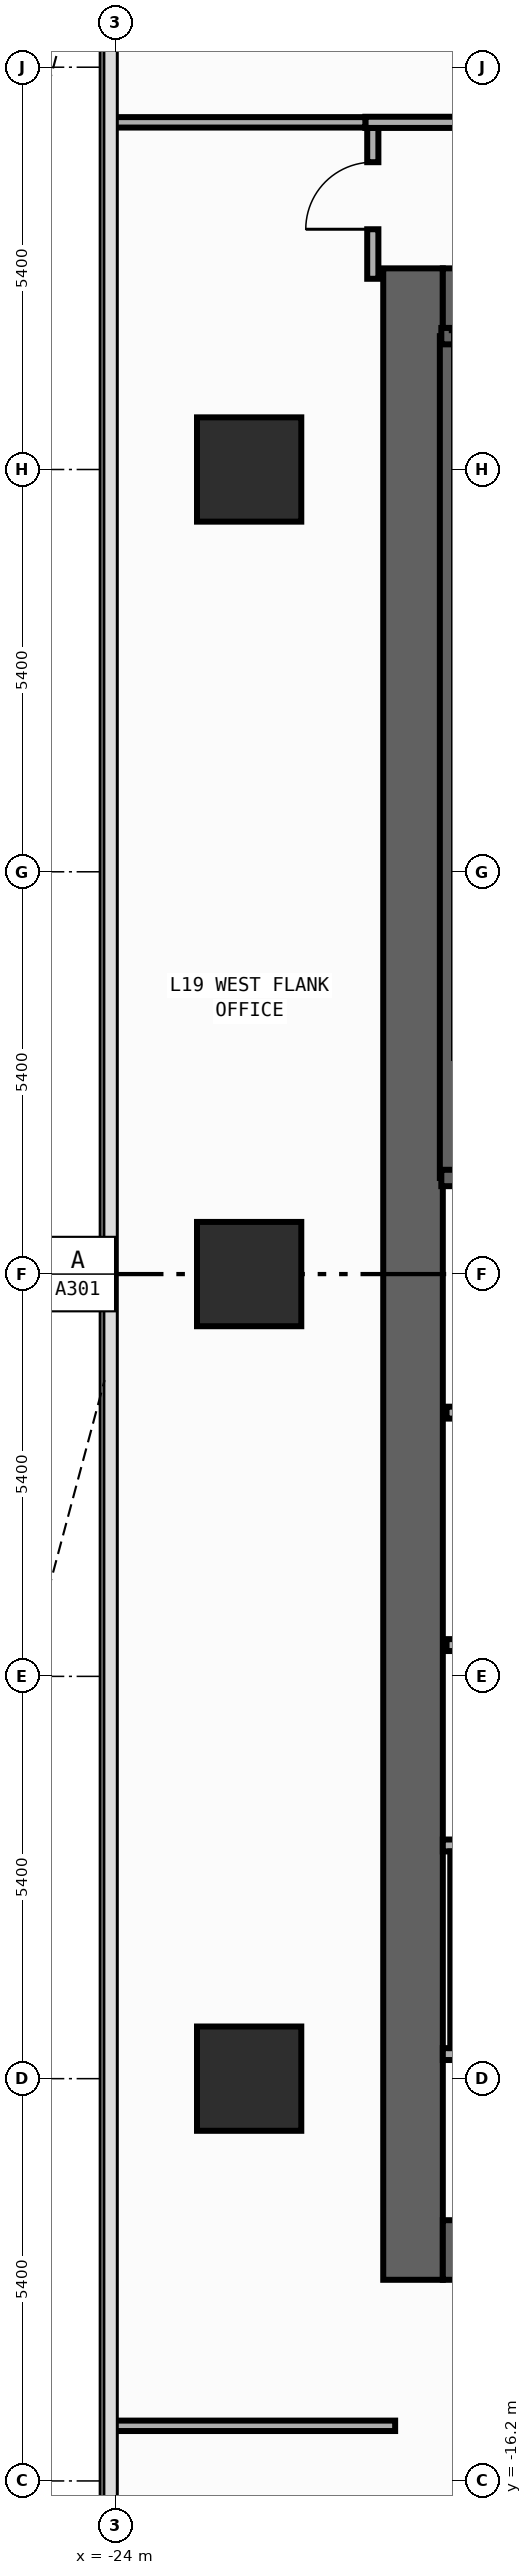
"""IFC4 building model, lengths in metres.
Left out: names, types, materials, properties, quantities, classifications, styles, units other than length and angle.
Written with IfcOpenShell. Run it as: python <this file> out.ifc"""

import sys

from ifc_helpers import new_model, si_unit, direction, frame, frame_2d, origin, origin_2d, place, context, subcontext, project, spatial, rectangle, extrude, element, fill, save


model = new_model("IFC4")
c1 = context("Model", 3, precision=1e-05, world=origin(), true_north=direction((0.0, 1.0)))
c2 = subcontext(c1, "Body", "Model", "MODEL_VIEW")
j1 = project(units=[si_unit("LENGTHUNIT", "METRE"), si_unit("PLANEANGLEUNIT", "RADIAN")], contexts=[c1])
p1 = place(None, origin())
s1 = spatial("IfcSite", under=j1, at=p1, CompositionType="ELEMENT")
p2 = place(p1, origin())
s2 = spatial("IfcBuilding", under=s1, at=p2, CompositionType="ELEMENT")
p3 = place(p2, frame((0.0, 0.0, 80.6)))
s3 = spatial("IfcBuildingStorey", under=s2, at=p3, CompositionType="ELEMENT", Elevation=80.6)
p4 = place(p3, frame((-20.0, -13.5, 0.0), z_axis=(0.0, 0.0, 1.0), x_axis=(0.0, 1.0, 0.0)))
e1 = element("IfcWall", 1, at=p4, inside=s3, PredefinedType="SHEAR", context=c2, shape_type="SweptSolid", body=[
    extrude(rectangle(XDim=27.0, YDim=0.8, at=frame_2d((13.5, 0.0))), origin(), (0.0, 0.0, 1.0), 3.85),
])
for number, where, z_axis, x_axis in (
    (2, (-19.6, -13.1, 0.0), (0.0, 0.0, 1.0), (1.0, 0.0, 0.0)),
    (3, (-19.6, 13.1, 0.0), (0.0, 0.0, 1.0), (1.0, 0.0, 0.0)),
):
    element("IfcWall", number, at=place(p3, frame(where, z_axis=z_axis, x_axis=x_axis)), inside=s3, PredefinedType="SHEAR", context=c2, shape_type="SweptSolid", body=[
        extrude(rectangle(XDim=6.8, YDim=0.8, at=frame_2d((3.4, 0.0))), origin(), (0.0, 0.0, 1.0), 3.85),
    ])
p5 = place(p3, frame((-19.53, 1.29, 0.0), z_axis=(0.0, 0.0, 1.0), x_axis=(0.0, 1.0, 0.0)))
e4 = element("IfcWall", 4, at=p5, inside=s3, PredefinedType="SHEAR", context=c2, shape_type="SweptSolid", body=[
    extrude(rectangle(XDim=11.3, YDim=0.22, at=frame_2d((5.65, 0.0))), origin(), (0.0, 0.0, 1.0), 3.85),
])
p6 = place(p3, frame((-19.62, 12.59, 0.0), z_axis=(0.0, 0.0, 1.0), x_axis=(1.0, 0.0, 0.0)))
e5 = element("IfcWall", 5, at=p6, inside=s3, PredefinedType="SHEAR", context=c2, shape_type="SweptSolid", body=[
    extrude(rectangle(XDim=3.915, YDim=0.22, at=frame_2d((1.958, 0.0))), origin(), (0.0, 0.0, 1.0), 3.85),
])
p7 = place(p3, frame((-19.62, 1.29, 0.0), z_axis=(0.0, 0.0, 1.0), x_axis=(1.0, 0.0, 0.0)))
e6 = element("IfcWall", 6, at=p7, inside=s3, PredefinedType="SHEAR", context=c2, shape_type="SweptSolid", body=[
    extrude(rectangle(XDim=3.915, YDim=0.22, at=frame_2d((1.958, 0.0))), origin(), (0.0, 0.0, 1.0), 3.85),
])
p8 = place(p7, frame((1.08, 0.0, 0.0)))
e7 = element("IfcOpeningElement", 7, at=p8, cuts=e6, PredefinedType="OPENING", context=c2, shape_type="SweptSolid", body=[
    extrude(rectangle(XDim=1.1, YDim=2.2, at=frame_2d((0.55, 1.1))), frame((0.0, 0.12, 0.0), z_axis=(0.0, -1.0, 0.0), x_axis=(1.0, 0.0, 0.0)), (0.0, 0.0, 1.0), 0.24),
])
for number, where, z_axis, x_axis in (
    (8, (-22.2, -10.8, 0.0), (0.0, 0.0, 1.0), (1.0, 0.0, 0.0)),
    (9, (-22.2, 0.0, 0.0), (0.0, 0.0, 1.0), (1.0, 0.0, 0.0)),
    (10, (-22.2, 10.8, 0.0), (0.0, 0.0, 1.0), (1.0, 0.0, 0.0)),
):
    element("IfcColumn", number, at=place(p3, frame(where, z_axis=z_axis, x_axis=x_axis)), inside=s3, PredefinedType="COLUMN", context=c2, shape_type="SweptSolid", body=[
        extrude(rectangle(XDim=1.4, YDim=1.4, at=origin_2d()), origin(), (0.0, 0.0, 1.0), 4.2),
    ])
p9 = place(p3, frame((-19.55, -1.86, 0.0), z_axis=(0.0, 0.0, 1.0), x_axis=(1.0, 0.0, 0.0)))
e11 = element("IfcWall", 11, at=p9, inside=s3, PredefinedType="STANDARD", context=c2, shape_type="SweptSolid", body=[
    extrude(rectangle(XDim=3.8, YDim=0.16, at=frame_2d((1.9, 0.0))), origin(), (0.0, 0.0, 1.0), 3.85),
])
p10 = place(p9, frame((1.18, 0.0, 0.0)))
e12 = element("IfcOpeningElement", 12, at=p10, cuts=e11, PredefinedType="OPENING", context=c2, shape_type="SweptSolid", body=[
    extrude(rectangle(XDim=1.15, YDim=2.2, at=frame_2d((0.575, 1.1))), frame((0.0, 0.09, 0.0), z_axis=(0.0, -1.0, 0.0), x_axis=(1.0, 0.0, 0.0)), (0.0, 0.0, 1.0), 0.18),
])
p11 = place(p3, frame((-19.55, -4.98, 0.0), z_axis=(0.0, 0.0, 1.0), x_axis=(1.0, 0.0, 0.0)))
e13 = element("IfcWall", 13, at=p11, inside=s3, PredefinedType="STANDARD", context=c2, shape_type="SweptSolid", body=[
    extrude(rectangle(XDim=3.8, YDim=0.16, at=frame_2d((1.9, 0.0))), origin(), (0.0, 0.0, 1.0), 3.85),
])
for number, where, z_axis, x_axis in (
    (14, (-19.6, -10.47, 0.0), (0.0, 0.0, 1.0), (1.0, 0.0, 0.0)),
    (15, (-19.6, -7.67, 0.0), (0.0, 0.0, 1.0), (1.0, 0.0, 0.0)),
):
    element("IfcWall", number, at=place(p3, frame(where, z_axis=z_axis, x_axis=x_axis)), inside=s3, PredefinedType="PARTITIONING", context=c2, shape_type="SweptSolid", body=[
        extrude(rectangle(XDim=2.29, YDim=0.16, at=frame_2d((1.145, 0.0))), origin(), (0.0, 0.0, 1.0), 3.85),
    ])
p12 = place(p3, frame((-20.54, 13.36, 0.0), z_axis=(0.0, 0.0, 1.0), x_axis=(0.0, 1.0, 0.0)))
e16 = element("IfcWall", 16, at=p12, inside=s3, PredefinedType="PARTITIONING", context=c2, shape_type="SweptSolid", body=[
    extrude(rectangle(XDim=2.025, YDim=0.15, at=frame_2d((1.012, 0.0))), origin(), (0.0, 0.0, 1.0), 3.85),
])
p13 = place(p12, frame((0.665, 0.0, 0.0)))
e17 = element("IfcOpeningElement", 17, at=p13, cuts=e16, PredefinedType="OPENING", context=c2, shape_type="SweptSolid", body=[
    extrude(rectangle(XDim=0.9, YDim=2.15, at=frame_2d((0.45, 1.075))), frame((0.0, 0.085, 0.0), z_axis=(0.0, -1.0, 0.0), x_axis=(1.0, 0.0, 0.0)), (0.0, 0.0, 1.0), 0.17),
])
p14 = place(p3, frame((-20.64, 15.46, 0.0), z_axis=(0.0, 0.0, 1.0), x_axis=(1.0, 0.0, 0.0)))
e18 = element("IfcWall", 18, at=p14, inside=s3, PredefinedType="PARTITIONING", context=c2, shape_type="SweptSolid", body=[
    extrude(rectangle(XDim=7.312, YDim=0.15, at=frame_2d((3.656, 0.0))), origin(), (0.0, 0.0, 1.0), 3.85),
])
p15 = place(p14, frame((2.698, 0.0, 0.0)))
e19 = element("IfcOpeningElement", 19, at=p15, cuts=e18, PredefinedType="OPENING", context=c2, shape_type="SweptSolid", body=[
    extrude(rectangle(XDim=0.9, YDim=2.15, at=frame_2d((0.45, 1.075))), frame((0.0, 0.085, 0.0), z_axis=(0.0, -1.0, 0.0), x_axis=(1.0, 0.0, 0.0)), (0.0, 0.0, 1.0), 0.17),
])
p16 = place(p3, frame((-24.055, 15.46, 0.0), z_axis=(0.0, 0.0, 1.0), x_axis=(1.0, 0.0, 0.0)))
e20 = element("IfcWall", 20, at=p16, inside=s3, PredefinedType="PARTITIONING", context=c2, shape_type="SweptSolid", body=[
    extrude(rectangle(XDim=3.415, YDim=0.14, at=frame_2d((1.708, 0.0))), origin(), (0.0, 0.0, 1.0), 3.85),
])
p17 = place(p3, frame((-24.055, -15.46, 0.0), z_axis=(0.0, 0.0, 1.0), x_axis=(1.0, 0.0, 0.0)))
e21 = element("IfcWall", 21, at=p17, inside=s3, PredefinedType="PARTITIONING", context=c2, shape_type="SweptSolid", body=[
    extrude(rectangle(XDim=3.815, YDim=0.14, at=frame_2d((1.907, 0.0))), origin(), (0.0, 0.0, 1.0), 3.85),
])
p18 = place(p3, frame((-19.45, -10.39, 0.0), z_axis=(0.0, 0.0, 1.0), x_axis=(0.0, 1.0, 0.0)))
e22 = element("IfcWall", 22, at=p18, inside=s3, PredefinedType="PARTITIONING", context=c2, shape_type="SweptSolid", body=[
    extrude(rectangle(XDim=2.64, YDim=0.1, at=frame_2d((1.32, 0.0))), origin(), (0.0, 0.0, 1.0), 3.85),
])
p19 = place(p13, origin())
e23 = element("IfcDoor", 23, at=p19, inside=s3, OperationType="SINGLE_SWING_LEFT", PredefinedType="DOOR", context=c2, shape_type="SweptSolid", body=[
    extrude(rectangle(XDim=0.9, YDim=2.15, at=frame_2d((0.45, 1.075))), frame((0.0, 0.025, 0.0), z_axis=(0.0, -1.0, 0.0), x_axis=(1.0, 0.0, 0.0)), (0.0, 0.0, 1.0), 0.05),
])
fill(e17, e23)
save(model, sys.argv[1])
